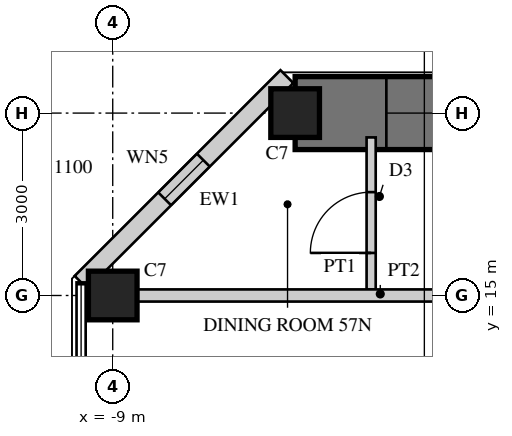
"""IFC4 building model, lengths in metres.
Left out: names, types, materials, properties, quantities, classifications, styles, units other than length and angle.
Written with IfcOpenShell. Run it as: python <this file> out.ifc"""

import sys

from ifc_helpers import new_model, si_unit, direction, frame, frame_2d, origin, origin_2d, place, context, subcontext, project, spatial, rectangle, hollow_rectangle, extrude, element, fill, save


model = new_model("IFC4")
c1 = context("Model", 3, precision=1e-05, world=origin(), true_north=direction((0.0, 1.0)))
c2 = subcontext(c1, "Body", "Model", "MODEL_VIEW")
j1 = project(units=[si_unit("LENGTHUNIT", "METRE"), si_unit("PLANEANGLEUNIT", "RADIAN")], contexts=[c1])
p1 = place(None, origin())
s1 = spatial("IfcSite", under=j1, at=p1, CompositionType="ELEMENT")
p2 = place(p1, origin())
s2 = spatial("IfcBuilding", under=s1, at=p2, CompositionType="ELEMENT")
p3 = place(p2, frame((0.0, 0.0, 225.5)))
s3 = spatial("IfcBuildingStorey", under=s2, at=p3, CompositionType="ELEMENT", Elevation=225.5)
p4 = place(p3, frame((6.0, 18.0, 0.0), z_axis=(0.0, 0.0, 1.0), x_axis=(-1.0, 0.0, 0.0)))
e1 = element("IfcWall", 1, at=p4, inside=s3, PredefinedType="SHEAR", context=c2, shape_type="SweptSolid", body=[
    extrude(rectangle(XDim=12.0, YDim=1.2, at=frame_2d((6.0, 0.0))), origin(), (0.0, 0.0, 1.0), 3.4),
])
p5 = place(p4, frame((1.5, 0.0, 0.6)))
e2 = element("IfcOpeningElement", 2, at=p5, cuts=e1, PredefinedType="OPENING", context=c2, shape_type="SweptSolid", body=[
    extrude(rectangle(XDim=3.0, YDim=2.4, at=frame_2d((1.5, 1.2))), frame((0.0, 0.61, 0.0), z_axis=(0.0, -1.0, 0.0), x_axis=(1.0, 0.0, 0.0)), (0.0, 0.0, 1.0), 1.22),
])
p6 = place(p4, frame((7.5, 0.0, 0.6)))
e3 = element("IfcOpeningElement", 3, at=p6, cuts=e1, PredefinedType="OPENING", context=c2, shape_type="SweptSolid", body=[
    extrude(rectangle(XDim=3.0, YDim=2.4, at=frame_2d((1.5, 1.2))), frame((0.0, 0.61, 0.0), z_axis=(0.0, -1.0, 0.0), x_axis=(1.0, 0.0, 0.0)), (0.0, 0.0, 1.0), 1.22),
])
for number, where, z_axis, x_axis in (
    (4, (-9.0, 15.0, 0.0), (0.0, 0.0, 1.0), (1.0, 0.0, 0.0)),
    (5, (-6.0, 18.0, 0.0), (0.0, 0.0, 1.0), (1.0, 0.0, 0.0)),
):
    element("IfcColumn", number, at=place(p3, frame(where, z_axis=z_axis, x_axis=x_axis)), inside=s3, PredefinedType="COLUMN", context=c2, shape_type="SweptSolid", body=[
        extrude(rectangle(XDim=0.8, YDim=0.8, at=origin_2d()), origin(), (0.0, 0.0, 1.0), 3.4),
    ])
p7 = place(p3, frame((-6.135, 18.6, 0.0), z_axis=(0.0, 0.0, 1.0), x_axis=(-0.707081278264, -0.707132283189, 0.0)))
e6 = element("IfcWall", 6, at=p7, inside=s3, PredefinedType="SOLIDWALL", context=c2, shape_type="SweptSolid", body=[
    extrude(rectangle(XDim=4.787, YDim=0.3, at=frame_2d((2.393, 0.0))), origin(), (0.0, 0.0, 1.0), 3.22),
])
p8 = place(p7, frame((1.943, 0.0, 0.3)))
e7 = element("IfcOpeningElement", 7, at=p8, cuts=e6, PredefinedType="OPENING", context=c2, shape_type="SweptSolid", body=[
    extrude(rectangle(XDim=0.9, YDim=2.4, at=frame_2d((0.45, 1.2))), frame((0.0, 0.16, 0.0), z_axis=(0.0, -1.0, 0.0), x_axis=(1.0, 0.0, 0.0)), (0.0, 0.0, 1.0), 0.32),
])
p9 = place(p3, frame((-4.75, 15.1, 0.0), z_axis=(0.0, 0.0, 1.0), x_axis=(0.0, 1.0, 0.0)))
e8 = element("IfcWall", 8, at=p9, inside=s3, PredefinedType="PARTITIONING", context=c2, shape_type="SweptSolid", body=[
    extrude(rectangle(XDim=2.5, YDim=0.15, at=frame_2d((1.25, 0.0))), origin(), (0.0, 0.0, 1.0), 3.22),
])
p10 = place(p9, frame((0.6, 0.0, 0.0)))
e9 = element("IfcOpeningElement", 9, at=p10, cuts=e8, PredefinedType="OPENING", context=c2, shape_type="SweptSolid", body=[
    extrude(rectangle(XDim=1.0, YDim=2.1, at=frame_2d((0.5, 1.05))), frame((0.0, 0.085, 0.0), z_axis=(0.0, -1.0, 0.0), x_axis=(1.0, 0.0, 0.0)), (0.0, 0.0, 1.0), 0.17),
])
p11 = place(p3, frame((-0.6, 15.0, 0.0), z_axis=(0.0, 0.0, 1.0), x_axis=(-1.0, 0.0, 0.0)))
e10 = element("IfcWall", 10, at=p11, inside=s3, PredefinedType="SOLIDWALL", context=c2, shape_type="SweptSolid", body=[
    extrude(rectangle(XDim=8.0, YDim=0.2, at=frame_2d((4.0, 0.0))), origin(), (0.0, 0.0, 1.0), 2.52),
])
p12 = place(p11, frame((0.35, 0.0, 0.0)))
e11 = element("IfcOpeningElement", 11, at=p12, cuts=e10, PredefinedType="OPENING", context=c2, shape_type="SweptSolid", body=[
    extrude(rectangle(XDim=1.0, YDim=2.2, at=frame_2d((0.5, 1.1))), frame((0.0, 0.11, 0.0), z_axis=(0.0, -1.0, 0.0), x_axis=(1.0, 0.0, 0.0)), (0.0, 0.0, 1.0), 0.22),
])
p13 = place(p6, origin())
e12 = element("IfcWindow", 12, at=p13, inside=s3, PartitioningType="SINGLE_PANEL", PredefinedType="WINDOW", context=c2, shape_type="SweptSolid", body=[
    extrude(hollow_rectangle(XDim=3.0, YDim=2.4, WallThickness=0.06, at=frame_2d((1.5, 1.2))), frame((0.0, 0.03, 0.0), z_axis=(0.0, -1.0, 0.0), x_axis=(1.0, 0.0, 0.0)), (0.0, 0.0, 1.0), 0.06),
    extrude(rectangle(XDim=2.879, YDim=2.279, at=frame_2d((1.5, 1.2))), frame((0.0, 0.03, 0.0), z_axis=(0.0, -1.0, 0.0), x_axis=(1.0, 0.0, 0.0)), (0.0, 0.0, 1.0), 0.06),
])
fill(e3, e12)
p14 = place(p8, origin())
e13 = element("IfcWindow", 13, at=p14, inside=s3, PartitioningType="SINGLE_PANEL", PredefinedType="WINDOW", context=c2, shape_type="SweptSolid", body=[
    extrude(hollow_rectangle(XDim=0.9, YDim=2.4, WallThickness=0.06, at=frame_2d((0.45, 1.2))), frame((0.0, 0.03, 0.0), z_axis=(0.0, -1.0, 0.0), x_axis=(1.0, 0.0, 0.0)), (0.0, 0.0, 1.0), 0.06),
    extrude(rectangle(XDim=0.779, YDim=2.279, at=frame_2d((0.45, 1.2))), frame((0.0, 0.03, 0.0), z_axis=(0.0, -1.0, 0.0), x_axis=(1.0, 0.0, 0.0)), (0.0, 0.0, 1.0), 0.06),
])
fill(e7, e13)
p15 = place(p10, origin())
e14 = element("IfcDoor", 14, at=p15, inside=s3, OperationType="SINGLE_SWING_LEFT", PredefinedType="DOOR", context=c2, shape_type="SweptSolid", body=[
    extrude(rectangle(XDim=1.0, YDim=2.1, at=frame_2d((0.5, 1.05))), frame((0.0, 0.025, 0.0), z_axis=(0.0, -1.0, 0.0), x_axis=(1.0, 0.0, 0.0)), (0.0, 0.0, 1.0), 0.05),
])
fill(e9, e14)
save(model, sys.argv[1])
